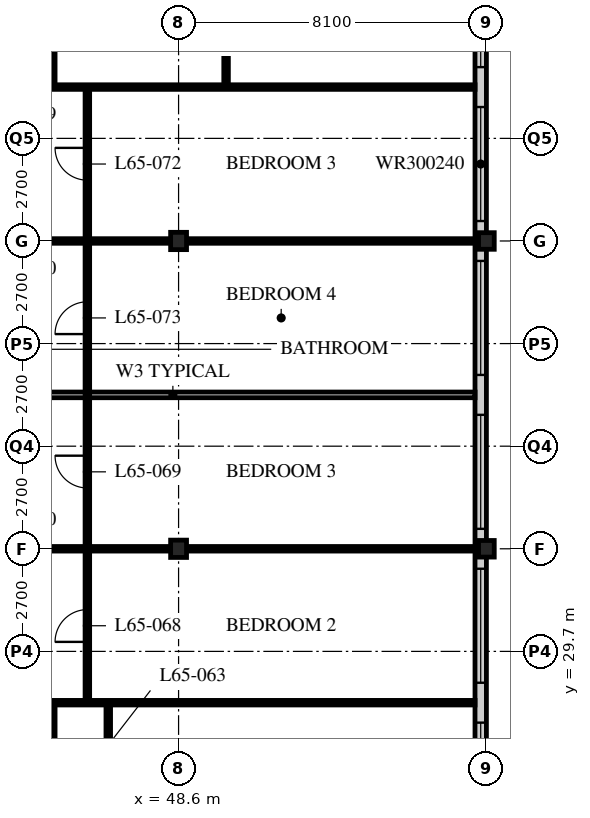
"""IFC4 building model, lengths in metres.
Left out: names, types, materials, properties, quantities, classifications, styles, units other than length and angle.
Written with IfcOpenShell. Run it as: python <this file> out.ifc"""

import sys

from ifc_helpers import new_model, si_unit, direction, frame, frame_2d, origin, origin_2d, place, context, subcontext, project, spatial, rectangle, i_section, extrude, element, fill, save


model = new_model("IFC4")
c1 = context("Model", 3, precision=1e-05, world=origin(), true_north=direction((0.0, 1.0)))
c2 = subcontext(c1, "Body", "Model", "MODEL_VIEW")
j1 = project(units=[si_unit("LENGTHUNIT", "METRE"), si_unit("PLANEANGLEUNIT", "RADIAN")], contexts=[c1])
p1 = place(None, origin())
s1 = spatial("IfcSite", under=j1, at=p1, CompositionType="ELEMENT")
p2 = place(p1, origin())
s2 = spatial("IfcBuilding", under=s1, at=p2, CompositionType="ELEMENT")
p3 = place(p2, frame((0.0, 0.0, 254.1)))
s3 = spatial("IfcBuildingStorey", under=s2, at=p3, CompositionType="ELEMENT", Elevation=254.1)
for number, where, z_axis, x_axis in (
    (1, (48.6, 32.4, 0.0), (0.0, 0.0, 1.0), (1.0, 0.0, 0.0)),
    (2, (48.6, 40.5, 0.0), (0.0, 0.0, 1.0), (1.0, 0.0, 0.0)),
):
    element("IfcColumn", number, at=place(p3, frame(where, z_axis=z_axis, x_axis=x_axis)), inside=s3, PredefinedType="COLUMN", context=c2, shape_type="SweptSolid", body=[
        extrude(i_section(OverallWidth=0.418, OverallDepth=0.456, WebThickness=0.042, FlangeThickness=0.067, FilletRadius=0.015, at=origin_2d()), origin(), (0.0, 0.0, 1.0), 3.9),
    ])
for number, where, z_axis, x_axis in (
    (3, (56.7, 32.4, 0.0), (0.0, 0.0, 1.0), (1.0, 0.0, 0.0)),
    (4, (56.7, 40.5, 0.0), (0.0, 0.0, 1.0), (1.0, 0.0, 0.0)),
):
    element("IfcColumn", number, at=place(p3, frame(where, z_axis=z_axis, x_axis=x_axis)), inside=s3, PredefinedType="COLUMN", context=c2, shape_type="SweptSolid", body=[
        extrude(i_section(OverallWidth=0.412, OverallDepth=0.437, WebThickness=0.036, FlangeThickness=0.058, FilletRadius=0.015, at=origin_2d()), origin(), (0.0, 0.0, 1.0), 3.9),
    ])
p4 = place(p3, frame((56.55, 24.6, 0.0), z_axis=(0.0, 0.0, 1.0), x_axis=(0.0, 1.0, 0.0)))
e5 = element("IfcWall", 5, at=p4, inside=s3, PredefinedType="SOLIDWALL", context=c2, shape_type="SweptSolid", body=[
    extrude(rectangle(XDim=32.1, YDim=0.3, at=frame_2d((16.05, 0.0))), origin(), (0.0, 0.0, 1.0), 3.69),
])
p5 = place(p4, frame((0.225, 0.0, 0.6)))
e6 = element("IfcOpeningElement", 6, at=p5, cuts=e5, PredefinedType="OPENING", context=c2, shape_type="SweptSolid", body=[
    extrude(rectangle(XDim=3.0, YDim=2.4, at=frame_2d((1.5, 1.2))), frame((0.0, 0.16, 0.0), z_axis=(0.0, -1.0, 0.0), x_axis=(1.0, 0.0, 0.0)), (0.0, 0.0, 1.0), 0.32),
])
p6 = place(p4, frame((4.275, 0.0, 0.6)))
e7 = element("IfcOpeningElement", 7, at=p6, cuts=e5, PredefinedType="OPENING", context=c2, shape_type="SweptSolid", body=[
    extrude(rectangle(XDim=3.0, YDim=2.4, at=frame_2d((1.5, 1.2))), frame((0.0, 0.16, 0.0), z_axis=(0.0, -1.0, 0.0), x_axis=(1.0, 0.0, 0.0)), (0.0, 0.0, 1.0), 0.32),
])
p7 = place(p4, frame((8.325, 0.0, 0.6)))
e8 = element("IfcOpeningElement", 8, at=p7, cuts=e5, PredefinedType="OPENING", context=c2, shape_type="SweptSolid", body=[
    extrude(rectangle(XDim=3.0, YDim=2.4, at=frame_2d((1.5, 1.2))), frame((0.0, 0.16, 0.0), z_axis=(0.0, -1.0, 0.0), x_axis=(1.0, 0.0, 0.0)), (0.0, 0.0, 1.0), 0.32),
])
p8 = place(p4, frame((12.375, 0.0, 0.6)))
e9 = element("IfcOpeningElement", 9, at=p8, cuts=e5, PredefinedType="OPENING", context=c2, shape_type="SweptSolid", body=[
    extrude(rectangle(XDim=3.0, YDim=2.4, at=frame_2d((1.5, 1.2))), frame((0.0, 0.16, 0.0), z_axis=(0.0, -1.0, 0.0), x_axis=(1.0, 0.0, 0.0)), (0.0, 0.0, 1.0), 0.32),
])
p9 = place(p4, frame((16.425, 0.0, 0.6)))
e10 = element("IfcOpeningElement", 10, at=p9, cuts=e5, PredefinedType="OPENING", context=c2, shape_type="SweptSolid", body=[
    extrude(rectangle(XDim=3.0, YDim=2.4, at=frame_2d((1.5, 1.2))), frame((0.0, 0.16, 0.0), z_axis=(0.0, -1.0, 0.0), x_axis=(1.0, 0.0, 0.0)), (0.0, 0.0, 1.0), 0.32),
])
p10 = place(p4, frame((20.475, 0.0, 0.6)))
e11 = element("IfcOpeningElement", 11, at=p10, cuts=e5, PredefinedType="OPENING", context=c2, shape_type="SweptSolid", body=[
    extrude(rectangle(XDim=3.0, YDim=2.4, at=frame_2d((1.5, 1.2))), frame((0.0, 0.16, 0.0), z_axis=(0.0, -1.0, 0.0), x_axis=(1.0, 0.0, 0.0)), (0.0, 0.0, 1.0), 0.32),
])
p11 = place(p4, frame((24.525, 0.0, 0.6)))
e12 = element("IfcOpeningElement", 12, at=p11, cuts=e5, PredefinedType="OPENING", context=c2, shape_type="SweptSolid", body=[
    extrude(rectangle(XDim=3.0, YDim=2.4, at=frame_2d((1.5, 1.2))), frame((0.0, 0.16, 0.0), z_axis=(0.0, -1.0, 0.0), x_axis=(1.0, 0.0, 0.0)), (0.0, 0.0, 1.0), 0.32),
])
p12 = place(p4, frame((28.575, 0.0, 0.6)))
e13 = element("IfcOpeningElement", 13, at=p12, cuts=e5, PredefinedType="OPENING", context=c2, shape_type="SweptSolid", body=[
    extrude(rectangle(XDim=3.0, YDim=2.4, at=frame_2d((1.5, 1.2))), frame((0.0, 0.16, 0.0), z_axis=(0.0, -1.0, 0.0), x_axis=(1.0, 0.0, 0.0)), (0.0, 0.0, 1.0), 0.32),
])
p13 = place(p3, frame((40.5, 36.45, 0.0), z_axis=(0.0, 0.0, 1.0), x_axis=(1.0, 0.0, 0.0)))
e14 = element("IfcWall", 14, at=p13, inside=s3, PredefinedType="PARTITIONING", context=c2, shape_type="SweptSolid", body=[
    extrude(rectangle(XDim=15.9, YDim=0.15, at=frame_2d((7.95, 0.0))), origin(), (0.0, 0.0, 1.0), 3.69),
])
p14 = place(p3, frame((45.3, 26.05, 0.0), z_axis=(0.0, 0.0, 1.0), x_axis=(0.0, 1.0, 0.0)))
e15 = element("IfcWall", 15, at=p14, inside=s3, PredefinedType="PARTITIONING", context=c2, shape_type="SweptSolid", body=[
    extrude(rectangle(XDim=2.3, YDim=0.1, at=frame_2d((1.15, 0.0))), origin(), (0.0, 0.0, 1.0), 3.69),
])
p15 = place(p3, frame((42.9, 28.35, 0.0), z_axis=(0.0, 0.0, 1.0), x_axis=(1.0, 0.0, 0.0)))
e16 = element("IfcWall", 16, at=p15, inside=s3, PredefinedType="PARTITIONING", context=c2, shape_type="SweptSolid", body=[
    extrude(rectangle(XDim=13.5, YDim=0.12, at=frame_2d((6.75, 0.0))), origin(), (0.0, 0.0, 1.0), 3.69),
])
p16 = place(p3, frame((42.9, 32.4, 0.0), z_axis=(0.0, 0.0, 1.0), x_axis=(1.0, 0.0, 0.0)))
e17 = element("IfcWall", 17, at=p16, inside=s3, PredefinedType="PARTITIONING", context=c2, shape_type="SweptSolid", body=[
    extrude(rectangle(XDim=13.5, YDim=0.12, at=frame_2d((6.75, 0.0))), origin(), (0.0, 0.0, 1.0), 3.078),
])
p17 = place(p3, frame((45.3, 46.85, 0.0), z_axis=(0.0, 0.0, 1.0), x_axis=(0.0, -1.0, 0.0)))
e18 = element("IfcWall", 18, at=p17, inside=s3, PredefinedType="PARTITIONING", context=c2, shape_type="SweptSolid", body=[
    extrude(rectangle(XDim=2.3, YDim=0.1, at=frame_2d((1.15, 0.0))), origin(), (0.0, 0.0, 1.0), 3.69),
])
p18 = place(p3, frame((42.9, 44.55, 0.0), z_axis=(0.0, 0.0, 1.0), x_axis=(1.0, 0.0, 0.0)))
e19 = element("IfcWall", 19, at=p18, inside=s3, PredefinedType="PARTITIONING", context=c2, shape_type="SweptSolid", body=[
    extrude(rectangle(XDim=13.5, YDim=0.12, at=frame_2d((6.75, 0.0))), origin(), (0.0, 0.0, 1.0), 3.69),
])
p19 = place(p3, frame((42.9, 40.5, 0.0), z_axis=(0.0, 0.0, 1.0), x_axis=(1.0, 0.0, 0.0)))
e20 = element("IfcWall", 20, at=p19, inside=s3, PredefinedType="PARTITIONING", context=c2, shape_type="SweptSolid", body=[
    extrude(rectangle(XDim=13.5, YDim=0.12, at=frame_2d((6.75, 0.0))), origin(), (0.0, 0.0, 1.0), 3.078),
])
p20 = place(p3, frame((46.75, 24.3, 0.0), z_axis=(0.0, 0.0, 1.0), x_axis=(0.0, 1.0, 0.0)))
e21 = element("IfcWall", 21, at=p20, inside=s3, PredefinedType="PARTITIONING", context=c2, shape_type="SweptSolid", body=[
    extrude(rectangle(XDim=4.05, YDim=0.12, at=frame_2d((2.025, 0.0))), origin(), (0.0, 0.0, 1.0), 3.69),
])
p21 = place(p20, frame((1.6, 0.0, 0.0)))
e22 = element("IfcOpeningElement", 22, at=p21, cuts=e21, PredefinedType="OPENING", context=c2, shape_type="SweptSolid", body=[
    extrude(rectangle(XDim=0.85, YDim=2.1, at=frame_2d((0.425, 1.05))), frame((0.0, 0.07, 0.0), z_axis=(0.0, -1.0, 0.0), x_axis=(1.0, 0.0, 0.0)), (0.0, 0.0, 1.0), 0.14),
])
p22 = place(p3, frame((46.2, 28.35, 0.0), z_axis=(0.0, 0.0, 1.0), x_axis=(0.0, 1.0, 0.0)))
e23 = element("IfcWall", 23, at=p22, inside=s3, PredefinedType="PARTITIONING", context=c2, shape_type="SweptSolid", body=[
    extrude(rectangle(XDim=16.2, YDim=0.12, at=frame_2d((8.1, 0.0))), origin(), (0.0, 0.0, 1.0), 3.69),
])
p23 = place(p22, frame((1.6, 0.0, 0.0)))
e24 = element("IfcOpeningElement", 24, at=p23, cuts=e23, PredefinedType="OPENING", context=c2, shape_type="SweptSolid", body=[
    extrude(rectangle(XDim=0.85, YDim=2.1, at=frame_2d((0.425, 1.05))), frame((0.0, 0.07, 0.0), z_axis=(0.0, -1.0, 0.0), x_axis=(1.0, 0.0, 0.0)), (0.0, 0.0, 1.0), 0.14),
])
p24 = place(p22, frame((5.65, 0.0, 0.0)))
e25 = element("IfcOpeningElement", 25, at=p24, cuts=e23, PredefinedType="OPENING", context=c2, shape_type="SweptSolid", body=[
    extrude(rectangle(XDim=0.85, YDim=2.1, at=frame_2d((0.425, 1.05))), frame((0.0, 0.07, 0.0), z_axis=(0.0, -1.0, 0.0), x_axis=(1.0, 0.0, 0.0)), (0.0, 0.0, 1.0), 0.14),
])
p25 = place(p22, frame((13.75, 0.0, 0.0)))
e26 = element("IfcOpeningElement", 26, at=p25, cuts=e23, PredefinedType="OPENING", context=c2, shape_type="SweptSolid", body=[
    extrude(rectangle(XDim=0.85, YDim=2.1, at=frame_2d((0.425, 1.05))), frame((0.0, 0.07, 0.0), z_axis=(0.0, -1.0, 0.0), x_axis=(1.0, 0.0, 0.0)), (0.0, 0.0, 1.0), 0.14),
])
p26 = place(p22, frame((9.7, 0.0, 0.0)))
e27 = element("IfcOpeningElement", 27, at=p26, cuts=e23, PredefinedType="OPENING", context=c2, shape_type="SweptSolid", body=[
    extrude(rectangle(XDim=0.85, YDim=2.1, at=frame_2d((0.425, 1.05))), frame((0.0, 0.07, 0.0), z_axis=(0.0, -1.0, 0.0), x_axis=(1.0, 0.0, 0.0)), (0.0, 0.0, 1.0), 0.14),
])
p27 = place(p3, frame((49.85, 44.55, 0.0), z_axis=(0.0, 0.0, 1.0), x_axis=(0.0, 1.0, 0.0)))
e28 = element("IfcWall", 28, at=p27, inside=s3, PredefinedType="PARTITIONING", context=c2, shape_type="SweptSolid", body=[
    extrude(rectangle(XDim=6.3, YDim=0.12, at=frame_2d((3.15, 0.0))), origin(), (0.0, 0.0, 1.0), 3.69),
])
p28 = place(p27, frame((2.725, 0.0, 0.0)))
e29 = element("IfcOpeningElement", 29, at=p28, cuts=e28, PredefinedType="OPENING", context=c2, shape_type="SweptSolid", body=[
    extrude(rectangle(XDim=0.85, YDim=2.1, at=frame_2d((0.425, 1.05))), frame((0.0, 0.07, 0.0), z_axis=(0.0, -1.0, 0.0), x_axis=(1.0, 0.0, 0.0)), (0.0, 0.0, 1.0), 0.14),
])
p29 = place(p5, origin())
e30 = element("IfcWindow", 30, at=p29, inside=s3, PartitioningType="SINGLE_PANEL", PredefinedType="WINDOW", context=c2, shape_type="SweptSolid", body=[
    extrude(rectangle(XDim=3.0, YDim=2.4, at=frame_2d((1.5, 1.2))), frame((0.0, 0.03, 0.0), z_axis=(0.0, -1.0, 0.0), x_axis=(1.0, 0.0, 0.0)), (0.0, 0.0, 1.0), 0.06),
])
fill(e6, e30)
p30 = place(p6, origin())
e31 = element("IfcWindow", 31, at=p30, inside=s3, PartitioningType="SINGLE_PANEL", PredefinedType="WINDOW", context=c2, shape_type="SweptSolid", body=[
    extrude(rectangle(XDim=3.0, YDim=2.4, at=frame_2d((1.5, 1.2))), frame((0.0, 0.03, 0.0), z_axis=(0.0, -1.0, 0.0), x_axis=(1.0, 0.0, 0.0)), (0.0, 0.0, 1.0), 0.06),
])
fill(e7, e31)
p31 = place(p7, origin())
e32 = element("IfcWindow", 32, at=p31, inside=s3, PartitioningType="SINGLE_PANEL", PredefinedType="WINDOW", context=c2, shape_type="SweptSolid", body=[
    extrude(rectangle(XDim=3.0, YDim=2.4, at=frame_2d((1.5, 1.2))), frame((0.0, 0.03, 0.0), z_axis=(0.0, -1.0, 0.0), x_axis=(1.0, 0.0, 0.0)), (0.0, 0.0, 1.0), 0.06),
])
fill(e8, e32)
p32 = place(p8, origin())
e33 = element("IfcWindow", 33, at=p32, inside=s3, PartitioningType="SINGLE_PANEL", PredefinedType="WINDOW", context=c2, shape_type="SweptSolid", body=[
    extrude(rectangle(XDim=3.0, YDim=2.4, at=frame_2d((1.5, 1.2))), frame((0.0, 0.03, 0.0), z_axis=(0.0, -1.0, 0.0), x_axis=(1.0, 0.0, 0.0)), (0.0, 0.0, 1.0), 0.06),
])
fill(e9, e33)
p33 = place(p9, origin())
e34 = element("IfcWindow", 34, at=p33, inside=s3, PartitioningType="SINGLE_PANEL", PredefinedType="WINDOW", context=c2, shape_type="SweptSolid", body=[
    extrude(rectangle(XDim=3.0, YDim=2.4, at=frame_2d((1.5, 1.2))), frame((0.0, 0.03, 0.0), z_axis=(0.0, -1.0, 0.0), x_axis=(1.0, 0.0, 0.0)), (0.0, 0.0, 1.0), 0.06),
])
fill(e10, e34)
p34 = place(p10, origin())
e35 = element("IfcWindow", 35, at=p34, inside=s3, PartitioningType="SINGLE_PANEL", PredefinedType="WINDOW", context=c2, shape_type="SweptSolid", body=[
    extrude(rectangle(XDim=3.0, YDim=2.4, at=frame_2d((1.5, 1.2))), frame((0.0, 0.03, 0.0), z_axis=(0.0, -1.0, 0.0), x_axis=(1.0, 0.0, 0.0)), (0.0, 0.0, 1.0), 0.06),
])
fill(e11, e35)
p35 = place(p23, origin())
e36 = element("IfcDoor", 36, at=p35, inside=s3, OperationType="SINGLE_SWING_LEFT", PredefinedType="DOOR", context=c2, shape_type="SweptSolid", body=[
    extrude(rectangle(XDim=0.85, YDim=2.1, at=frame_2d((0.425, 1.05))), frame((0.0, 0.025, 0.0), z_axis=(0.0, -1.0, 0.0), x_axis=(1.0, 0.0, 0.0)), (0.0, 0.0, 1.0), 0.05),
])
fill(e24, e36)
p36 = place(p24, origin())
e37 = element("IfcDoor", 37, at=p36, inside=s3, OperationType="SINGLE_SWING_RIGHT", PredefinedType="DOOR", context=c2, shape_type="SweptSolid", body=[
    extrude(rectangle(XDim=0.85, YDim=2.1, at=frame_2d((0.425, 1.05))), frame((0.0, 0.025, 0.0), z_axis=(0.0, -1.0, 0.0), x_axis=(1.0, 0.0, 0.0)), (0.0, 0.0, 1.0), 0.05),
])
fill(e25, e37)
p37 = place(p25, origin())
e38 = element("IfcDoor", 38, at=p37, inside=s3, OperationType="SINGLE_SWING_RIGHT", PredefinedType="DOOR", context=c2, shape_type="SweptSolid", body=[
    extrude(rectangle(XDim=0.85, YDim=2.1, at=frame_2d((0.425, 1.05))), frame((0.0, 0.025, 0.0), z_axis=(0.0, -1.0, 0.0), x_axis=(1.0, 0.0, 0.0)), (0.0, 0.0, 1.0), 0.05),
])
fill(e26, e38)
p38 = place(p26, origin())
e39 = element("IfcDoor", 39, at=p38, inside=s3, OperationType="SINGLE_SWING_LEFT", PredefinedType="DOOR", context=c2, shape_type="SweptSolid", body=[
    extrude(rectangle(XDim=0.85, YDim=2.1, at=frame_2d((0.425, 1.05))), frame((0.0, 0.025, 0.0), z_axis=(0.0, -1.0, 0.0), x_axis=(1.0, 0.0, 0.0)), (0.0, 0.0, 1.0), 0.05),
])
fill(e27, e39)
save(model, sys.argv[1])
